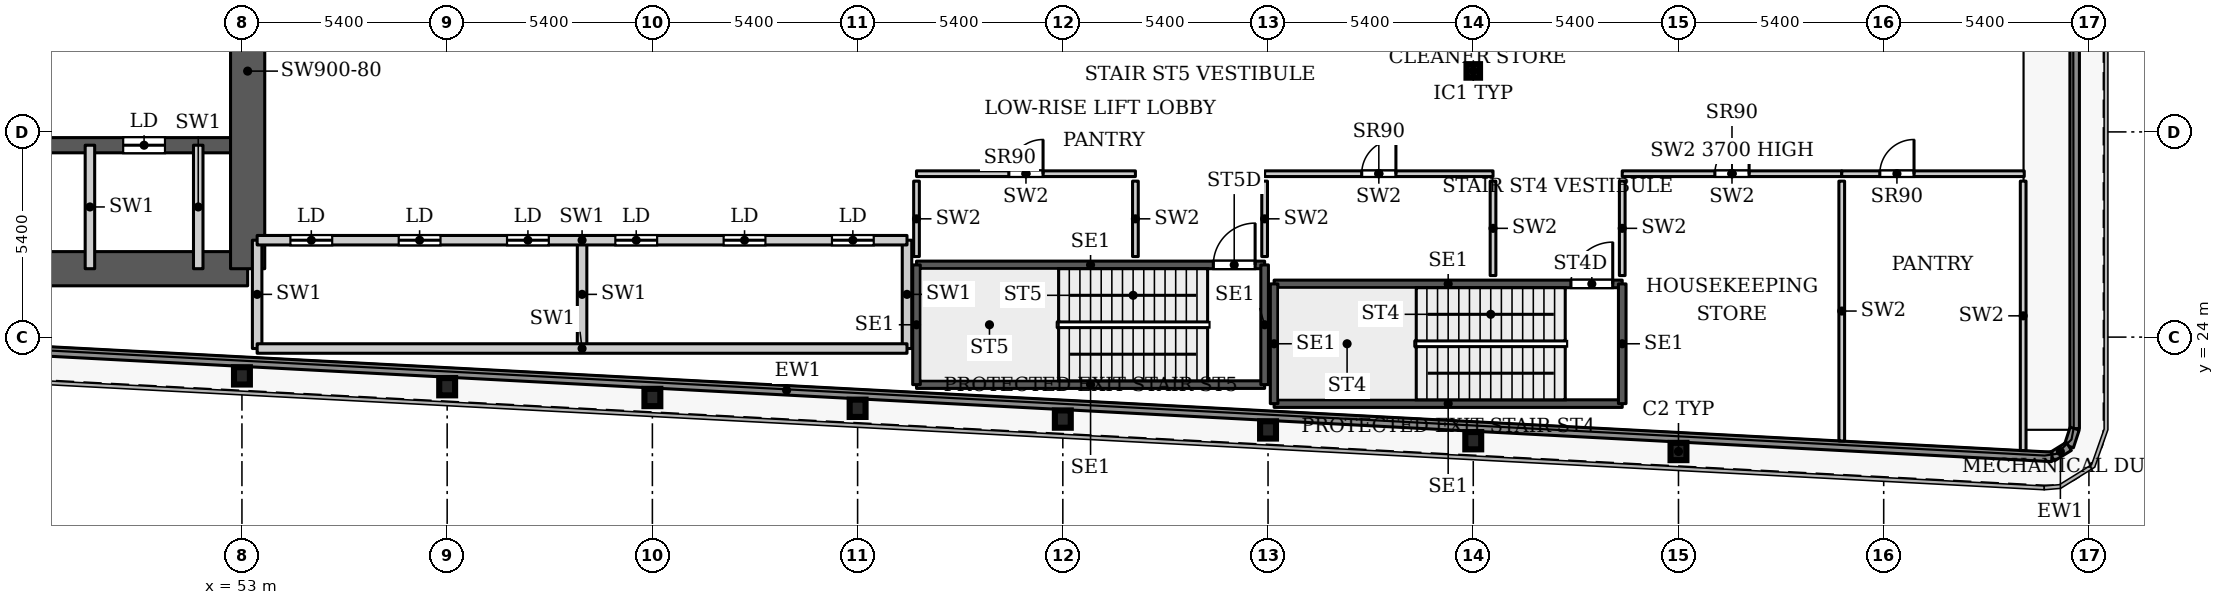
"""IFC4 building model, lengths in metres.
Left out: names, types, materials, properties, quantities, classifications, styles, units other than length and angle.
Written with IfcOpenShell. Run it as: python <this file> out.ifc"""

import sys

from ifc_helpers import new_model, si_unit, direction, frame, frame_2d, origin, origin_2d, place, context, subcontext, project, spatial, rectangle, hollow_rectangle, i_section, extrude, source, transform, mapped, element, fill, save


model = new_model("IFC4")
c1 = context("Model", 3, precision=1e-05, world=origin(), true_north=direction((0.0, 1.0)))
c2 = subcontext(c1, "Body", "Model", "MODEL_VIEW")
j1 = project(units=[si_unit("LENGTHUNIT", "METRE"), si_unit("PLANEANGLEUNIT", "RADIAN")], contexts=[c1])
p1 = place(None, origin())
s1 = spatial("IfcSite", under=j1, at=p1, CompositionType="ELEMENT")
p2 = place(p1, origin())
s2 = spatial("IfcBuilding", under=s1, at=p2, CompositionType="ELEMENT")
p3 = place(p2, frame((0.0, 0.0, 89.0)))
s3 = spatial("IfcBuildingStorey", under=s2, at=p3, CompositionType="ELEMENT", Elevation=89.0)
for number, where, z_axis, x_axis in (
    (1, (90.8, 20.99, 0.0), (0.0, 0.0, 1.0), (1.0, 0.0, 0.0)),
    (2, (85.4, 21.274, 0.0), (0.0, 0.0, 1.0), (1.0, 0.0, 0.0)),
    (3, (80.0, 21.558, 0.0), (0.0, 0.0, 1.0), (1.0, 0.0, 0.0)),
    (4, (74.6, 21.843, 0.0), (0.0, 0.0, 1.0), (1.0, 0.0, 0.0)),
    (5, (69.2, 22.127, 0.0), (0.0, 0.0, 1.0), (1.0, 0.0, 0.0)),
    (6, (63.8, 22.411, 0.0), (0.0, 0.0, 1.0), (1.0, 0.0, 0.0)),
    (7, (58.4, 22.695, 0.0), (0.0, 0.0, 1.0), (1.0, 0.0, 0.0)),
    (8, (53.0, 22.98, 0.0), (0.0, 0.0, 1.0), (1.0, 0.0, 0.0)),
):
    element("IfcColumn", number, at=place(p3, frame(where, z_axis=z_axis, x_axis=x_axis)), inside=s3, PredefinedType="COLUMN", context=c2, shape_type="SweptSolid", body=[
        extrude(i_section(OverallWidth=0.418, OverallDepth=0.455, WebThickness=0.042, FlangeThickness=0.068, FilletRadius=0.014, at=origin_2d()), origin(), (0.0, 0.0, 1.0), 5.1),
    ])
p4 = place(p3, frame((85.4, 31.005, 0.0), z_axis=(0.0, 0.0, 1.0), x_axis=(1.0, 0.0, 0.0)))
e9 = element("IfcColumn", 9, at=p4, inside=s3, PredefinedType="COLUMN", context=c2, shape_type="SweptSolid", body=[
    extrude(hollow_rectangle(XDim=0.356, YDim=0.356, WallThickness=0.016, InnerFilletRadius=0.016, OuterFilletRadius=0.032, at=origin_2d()), origin(), (0.0, 0.0, 1.0), 5.1),
])
p5 = place(p3, frame((34.75, 25.8, 0.0), z_axis=(0.0, 0.0, 1.0), x_axis=(1.0, 0.0, 0.0)))
e10 = element("IfcWall", 10, at=p5, inside=s3, PredefinedType="SHEAR", context=c2, shape_type="SweptSolid", body=[
    extrude(rectangle(XDim=18.4, YDim=0.9, at=frame_2d((9.2, 0.0))), origin(), (0.0, 0.0, 1.0), 5.1),
])
p6 = place(p3, frame((34.75, 29.05, 0.0), z_axis=(0.0, 0.0, 1.0), x_axis=(1.0, 0.0, 0.0)))
e11 = element("IfcWall", 11, at=p6, inside=s3, PredefinedType="SHEAR", context=c2, shape_type="SweptSolid", body=[
    extrude(rectangle(XDim=18.4, YDim=0.4, at=frame_2d((9.2, 0.0))), origin(), (0.0, 0.0, 1.0), 5.1),
])
p7 = place(p6, frame((15.125, 0.0, 0.0)))
e12 = element("IfcOpeningElement", 12, at=p7, cuts=e11, PredefinedType="OPENING", context=c2, shape_type="SweptSolid", body=[
    extrude(rectangle(XDim=1.1, YDim=2.2, at=frame_2d((0.55, 1.1))), frame((0.0, 0.21, 0.0), z_axis=(0.0, -1.0, 0.0), x_axis=(1.0, 0.0, 0.0)), (0.0, 0.0, 1.0), 0.42),
])
p8 = place(p3, frame((53.15, 25.8, 0.0), z_axis=(0.0, 0.0, 1.0), x_axis=(0.0, 1.0, 0.0)))
e13 = element("IfcWall", 13, at=p8, inside=s3, PredefinedType="SHEAR", context=c2, shape_type="SweptSolid", body=[
    extrude(rectangle(XDim=10.4, YDim=0.9, at=frame_2d((5.2, 0.0))), origin(), (0.0, 0.0, 1.0), 5.1),
])
p9 = place(p3, frame((101.225, 44.66, 0.0), z_axis=(0.0, 0.0, 1.0), x_axis=(0.0, -1.0, 0.0)))
e14 = element("IfcWall", 14, at=p9, inside=s3, PredefinedType="SOLIDWALL", context=c2, shape_type="SweptSolid", body=[
    extrude(rectangle(XDim=23.068, YDim=0.25, at=frame_2d((11.534, 0.0))), origin(), (0.0, 0.0, 1.0), 4.95),
])
p10 = place(p3, frame((101.225, 21.592, 0.0), z_axis=(0.0, 0.0, 1.0), x_axis=(-0.310245653009, -0.950656423104, 0.0)))
e15 = element("IfcWall", 15, at=p10, inside=s3, PredefinedType="SOLIDWALL", context=c2, shape_type="SweptSolid", body=[
    extrude(rectangle(XDim=0.49, YDim=0.25, at=frame_2d((0.245, 0.0))), origin(), (0.0, 0.0, 1.0), 4.95),
])
p11 = place(p3, frame((101.073, 21.126, 0.0), z_axis=(0.0, 0.0, 1.0), x_axis=(-0.849633012236, -0.527374387432, 0.0)))
e16 = element("IfcWall", 16, at=p11, inside=s3, PredefinedType="SOLIDWALL", context=c2, shape_type="SweptSolid", body=[
    extrude(rectangle(XDim=0.527, YDim=0.25, at=frame_2d((0.264, 0.0))), origin(), (0.0, 0.0, 1.0), 4.95),
])
p12 = place(p3, frame((100.625, 20.848, 0.0), z_axis=(0.0, 0.0, 1.0), x_axis=(-0.998617353906, 0.052567865445, 0.0)))
e17 = element("IfcWall", 17, at=p12, inside=s3, PredefinedType="SOLIDWALL", context=c2, shape_type="SweptSolid", body=[
    extrude(rectangle(XDim=66.678, YDim=0.25, at=frame_2d((33.339, 0.0))), origin(), (0.0, 0.0, 1.0), 4.95),
])
p13 = place(p3, frame((80.16, 22.25, 0.0), z_axis=(0.0, 0.0, 1.0), x_axis=(1.0, 0.0, 0.0)))
e18 = element("IfcWall", 18, at=p13, inside=s3, PredefinedType="SHEAR", context=c2, shape_type="SweptSolid", body=[
    extrude(rectangle(XDim=9.16, YDim=0.2, at=frame_2d((4.58, 0.0))), origin(), (0.0, 0.0, 1.0), 5.1),
])
p14 = place(p3, frame((80.16, 25.4, 0.0), z_axis=(0.0, 0.0, 1.0), x_axis=(1.0, 0.0, 0.0)))
e19 = element("IfcWall", 19, at=p14, inside=s3, PredefinedType="SHEAR", context=c2, shape_type="SweptSolid", body=[
    extrude(rectangle(XDim=9.16, YDim=0.2, at=frame_2d((4.58, 0.0))), origin(), (0.0, 0.0, 1.0), 5.1),
])
p15 = place(p14, frame((7.81, 0.0, 0.0)))
e20 = element("IfcOpeningElement", 20, at=p15, cuts=e19, PredefinedType="OPENING", context=c2, shape_type="SweptSolid", body=[
    extrude(rectangle(XDim=1.1, YDim=2.2, at=frame_2d((0.55, 1.1))), frame((0.0, 0.11, 0.0), z_axis=(0.0, -1.0, 0.0), x_axis=(1.0, 0.0, 0.0)), (0.0, 0.0, 1.0), 0.22),
])
for number, where, z_axis, x_axis in (
    (21, (80.16, 22.25, 0.0), (0.0, 0.0, 1.0), (0.0, 1.0, 0.0)),
    (22, (89.32, 22.25, 0.0), (0.0, 0.0, 1.0), (0.0, 1.0, 0.0)),
):
    element("IfcWall", number, at=place(p3, frame(where, z_axis=z_axis, x_axis=x_axis)), inside=s3, PredefinedType="SHEAR", context=c2, shape_type="SweptSolid", body=[
        extrude(rectangle(XDim=3.15, YDim=0.2, at=frame_2d((1.575, 0.0))), origin(), (0.0, 0.0, 1.0), 5.1),
    ])
p16 = place(p3, frame((70.75, 22.75, 0.0), z_axis=(0.0, 0.0, 1.0), x_axis=(1.0, 0.0, 0.0)))
e23 = element("IfcWall", 23, at=p16, inside=s3, PredefinedType="SHEAR", context=c2, shape_type="SweptSolid", body=[
    extrude(rectangle(XDim=9.16, YDim=0.2, at=frame_2d((4.58, 0.0))), origin(), (0.0, 0.0, 1.0), 5.1),
])
p17 = place(p3, frame((70.75, 25.9, 0.0), z_axis=(0.0, 0.0, 1.0), x_axis=(1.0, 0.0, 0.0)))
e24 = element("IfcWall", 24, at=p17, inside=s3, PredefinedType="SHEAR", context=c2, shape_type="SweptSolid", body=[
    extrude(rectangle(XDim=9.16, YDim=0.2, at=frame_2d((4.58, 0.0))), origin(), (0.0, 0.0, 1.0), 5.1),
])
p18 = place(p17, frame((7.81, 0.0, 0.0)))
e25 = element("IfcOpeningElement", 25, at=p18, cuts=e24, PredefinedType="OPENING", context=c2, shape_type="SweptSolid", body=[
    extrude(rectangle(XDim=1.1, YDim=2.2, at=frame_2d((0.55, 1.1))), frame((0.0, 0.11, 0.0), z_axis=(0.0, -1.0, 0.0), x_axis=(1.0, 0.0, 0.0)), (0.0, 0.0, 1.0), 0.22),
])
for number, where, z_axis, x_axis in (
    (26, (70.75, 22.75, 0.0), (0.0, 0.0, 1.0), (0.0, 1.0, 0.0)),
    (27, (79.91, 22.75, 0.0), (0.0, 0.0, 1.0), (0.0, 1.0, 0.0)),
):
    element("IfcWall", number, at=place(p3, frame(where, z_axis=z_axis, x_axis=x_axis)), inside=s3, PredefinedType="SHEAR", context=c2, shape_type="SweptSolid", body=[
        extrude(rectangle(XDim=3.15, YDim=0.2, at=frame_2d((1.575, 0.0))), origin(), (0.0, 0.0, 1.0), 5.1),
    ])
for number, where, z_axis, x_axis in (
    (28, (49.0, 25.8, 0.0), (0.0, 0.0, 1.0), (0.0, 1.0, 0.0)),
    (29, (51.85, 25.8, 0.0), (0.0, 0.0, 1.0), (0.0, 1.0, 0.0)),
):
    element("IfcWall", number, at=place(p3, frame(where, z_axis=z_axis, x_axis=x_axis)), inside=s3, PredefinedType="PARTITIONING", context=c2, shape_type="SweptSolid", body=[
        extrude(rectangle(XDim=3.25, YDim=0.25, at=frame_2d((1.625, 0.0))), origin(), (0.0, 0.0, 1.0), 5.1),
    ])
for number, where, z_axis, x_axis in (
    (30, (53.4, 23.7, 0.0), (0.0, 0.0, 1.0), (0.0, 1.0, 0.0)),
    (31, (61.95, 23.7, 0.0), (0.0, 0.0, 1.0), (0.0, 1.0, 0.0)),
    (32, (70.5, 23.7, 0.0), (0.0, 0.0, 1.0), (0.0, 1.0, 0.0)),
):
    element("IfcWall", number, at=place(p3, frame(where, z_axis=z_axis, x_axis=x_axis)), inside=s3, PredefinedType="PARTITIONING", context=c2, shape_type="SweptSolid", body=[
        extrude(rectangle(XDim=2.85, YDim=0.25, at=frame_2d((1.425, 0.0))), origin(), (0.0, 0.0, 1.0), 5.1),
    ])
p19 = place(p3, frame((53.4, 23.7, 0.0), z_axis=(0.0, 0.0, 1.0), x_axis=(1.0, 0.0, 0.0)))
e33 = element("IfcWall", 33, at=p19, inside=s3, PredefinedType="PARTITIONING", context=c2, shape_type="SweptSolid", body=[
    extrude(rectangle(XDim=17.1, YDim=0.25, at=frame_2d((8.55, 0.0))), origin(), (0.0, 0.0, 1.0), 5.1),
])
p20 = place(p3, frame((53.4, 26.55, 0.0), z_axis=(0.0, 0.0, 1.0), x_axis=(1.0, 0.0, 0.0)))
e34 = element("IfcWall", 34, at=p20, inside=s3, PredefinedType="PARTITIONING", context=c2, shape_type="SweptSolid", body=[
    extrude(rectangle(XDim=17.1, YDim=0.25, at=frame_2d((8.55, 0.0))), origin(), (0.0, 0.0, 1.0), 5.1),
])
p21 = place(p20, frame((0.875, 0.0, 0.0)))
e35 = element("IfcOpeningElement", 35, at=p21, cuts=e34, PredefinedType="OPENING", context=c2, shape_type="SweptSolid", body=[
    extrude(rectangle(XDim=1.1, YDim=2.2, at=frame_2d((0.55, 1.1))), frame((0.0, 0.135, 0.0), z_axis=(0.0, -1.0, 0.0), x_axis=(1.0, 0.0, 0.0)), (0.0, 0.0, 1.0), 0.27),
])
p22 = place(p20, frame((3.725, 0.0, 0.0)))
e36 = element("IfcOpeningElement", 36, at=p22, cuts=e34, PredefinedType="OPENING", context=c2, shape_type="SweptSolid", body=[
    extrude(rectangle(XDim=1.1, YDim=2.2, at=frame_2d((0.55, 1.1))), frame((0.0, 0.135, 0.0), z_axis=(0.0, -1.0, 0.0), x_axis=(1.0, 0.0, 0.0)), (0.0, 0.0, 1.0), 0.27),
])
p23 = place(p20, frame((6.575, 0.0, 0.0)))
e37 = element("IfcOpeningElement", 37, at=p23, cuts=e34, PredefinedType="OPENING", context=c2, shape_type="SweptSolid", body=[
    extrude(rectangle(XDim=1.1, YDim=2.2, at=frame_2d((0.55, 1.1))), frame((0.0, 0.135, 0.0), z_axis=(0.0, -1.0, 0.0), x_axis=(1.0, 0.0, 0.0)), (0.0, 0.0, 1.0), 0.27),
])
p24 = place(p20, frame((9.425, 0.0, 0.0)))
e38 = element("IfcOpeningElement", 38, at=p24, cuts=e34, PredefinedType="OPENING", context=c2, shape_type="SweptSolid", body=[
    extrude(rectangle(XDim=1.1, YDim=2.2, at=frame_2d((0.55, 1.1))), frame((0.0, 0.135, 0.0), z_axis=(0.0, -1.0, 0.0), x_axis=(1.0, 0.0, 0.0)), (0.0, 0.0, 1.0), 0.27),
])
p25 = place(p20, frame((12.275, 0.0, 0.0)))
e39 = element("IfcOpeningElement", 39, at=p25, cuts=e34, PredefinedType="OPENING", context=c2, shape_type="SweptSolid", body=[
    extrude(rectangle(XDim=1.1, YDim=2.2, at=frame_2d((0.55, 1.1))), frame((0.0, 0.135, 0.0), z_axis=(0.0, -1.0, 0.0), x_axis=(1.0, 0.0, 0.0)), (0.0, 0.0, 1.0), 0.27),
])
p26 = place(p20, frame((15.125, 0.0, 0.0)))
e40 = element("IfcOpeningElement", 40, at=p26, cuts=e34, PredefinedType="OPENING", context=c2, shape_type="SweptSolid", body=[
    extrude(rectangle(XDim=1.1, YDim=2.2, at=frame_2d((0.55, 1.1))), frame((0.0, 0.135, 0.0), z_axis=(0.0, -1.0, 0.0), x_axis=(1.0, 0.0, 0.0)), (0.0, 0.0, 1.0), 0.27),
])
p27 = place(p3, frame((70.75, 28.3, 0.0), z_axis=(0.0, 0.0, 1.0), x_axis=(1.0, 0.0, 0.0)))
e41 = element("IfcWall", 41, at=p27, inside=s3, PredefinedType="PARTITIONING", context=c2, shape_type="SweptSolid", body=[
    extrude(rectangle(XDim=5.76, YDim=0.15, at=frame_2d((2.88, 0.0))), origin(), (0.0, 0.0, 1.0), 5.1),
])
p28 = place(p27, frame((2.43, 0.0, 0.0)))
e42 = element("IfcOpeningElement", 42, at=p28, cuts=e41, PredefinedType="OPENING", context=c2, shape_type="SweptSolid", body=[
    extrude(rectangle(XDim=0.9, YDim=2.2, at=frame_2d((0.45, 1.1))), frame((0.0, 0.085, 0.0), z_axis=(0.0, -1.0, 0.0), x_axis=(1.0, 0.0, 0.0)), (0.0, 0.0, 1.0), 0.17),
])
for number, where, z_axis, x_axis in (
    (43, (70.75, 26.12, 0.0), (0.0, 0.0, 1.0), (0.0, 1.0, 0.0)),
    (44, (76.51, 26.12, 0.0), (0.0, 0.0, 1.0), (0.0, 1.0, 0.0)),
):
    element("IfcWall", number, at=place(p3, frame(where, z_axis=z_axis, x_axis=x_axis)), inside=s3, PredefinedType="PARTITIONING", context=c2, shape_type="SweptSolid", body=[
        extrude(rectangle(XDim=1.985, YDim=0.15, at=frame_2d((0.992, 0.0))), origin(), (0.0, 0.0, 1.0), 5.1),
    ])
p29 = place(p3, frame((79.91, 28.3, 0.0), z_axis=(0.0, 0.0, 1.0), x_axis=(1.0, 0.0, 0.0)))
e45 = element("IfcWall", 45, at=p29, inside=s3, PredefinedType="PARTITIONING", context=c2, shape_type="SweptSolid", body=[
    extrude(rectangle(XDim=6.01, YDim=0.15, at=frame_2d((3.005, 0.0))), origin(), (0.0, 0.0, 1.0), 5.1),
])
p30 = place(p29, frame((2.555, 0.0, 0.0)))
e46 = element("IfcOpeningElement", 46, at=p30, cuts=e45, PredefinedType="OPENING", context=c2, shape_type="SweptSolid", body=[
    extrude(rectangle(XDim=0.9, YDim=2.2, at=frame_2d((0.45, 1.1))), frame((0.0, 0.085, 0.0), z_axis=(0.0, -1.0, 0.0), x_axis=(1.0, 0.0, 0.0)), (0.0, 0.0, 1.0), 0.17),
])
p31 = place(p3, frame((79.91, 26.12, 0.0), z_axis=(0.0, 0.0, 1.0), x_axis=(0.0, 1.0, 0.0)))
e47 = element("IfcWall", 47, at=p31, inside=s3, PredefinedType="PARTITIONING", context=c2, shape_type="SweptSolid", body=[
    extrude(rectangle(XDim=1.985, YDim=0.15, at=frame_2d((0.992, 0.0))), origin(), (0.0, 0.0, 1.0), 5.1),
])
p32 = place(p3, frame((85.92, 25.62, 0.0), z_axis=(0.0, 0.0, 1.0), x_axis=(0.0, 1.0, 0.0)))
e48 = element("IfcWall", 48, at=p32, inside=s3, PredefinedType="PARTITIONING", context=c2, shape_type="SweptSolid", body=[
    extrude(rectangle(XDim=2.485, YDim=0.15, at=frame_2d((1.242, 0.0))), origin(), (0.0, 0.0, 1.0), 5.1),
])
p33 = place(p3, frame((89.32, 28.3, 0.0), z_axis=(0.0, 0.0, 1.0), x_axis=(1.0, 0.0, 0.0)))
e49 = element("IfcWall", 49, at=p33, inside=s3, PredefinedType="PARTITIONING", context=c2, shape_type="SweptSolid", body=[
    extrude(rectangle(XDim=5.776, YDim=0.15, at=frame_2d((2.888, 0.0))), origin(), (0.0, 0.0, 1.0), 3.7),
])
p34 = place(p33, frame((2.438, 0.0, 0.0)))
e50 = element("IfcOpeningElement", 50, at=p34, cuts=e49, PredefinedType="OPENING", context=c2, shape_type="SweptSolid", body=[
    extrude(rectangle(XDim=0.9, YDim=2.2, at=frame_2d((0.45, 1.1))), frame((0.0, 0.085, 0.0), z_axis=(0.0, -1.0, 0.0), x_axis=(1.0, 0.0, 0.0)), (0.0, 0.0, 1.0), 0.17),
])
p35 = place(p3, frame((89.32, 25.62, 0.0), z_axis=(0.0, 0.0, 1.0), x_axis=(0.0, 1.0, 0.0)))
e51 = element("IfcWall", 51, at=p35, inside=s3, PredefinedType="PARTITIONING", context=c2, shape_type="SweptSolid", body=[
    extrude(rectangle(XDim=2.485, YDim=0.15, at=frame_2d((1.242, 0.0))), origin(), (0.0, 0.0, 1.0), 5.1),
])
p36 = place(p3, frame((95.096, 21.267, 0.0), z_axis=(0.0, 0.0, 1.0), x_axis=(0.0, 1.0, 0.0)))
e52 = element("IfcWall", 52, at=p36, inside=s3, PredefinedType="PARTITIONING", context=c2, shape_type="SweptSolid", body=[
    extrude(rectangle(XDim=6.838, YDim=0.15, at=frame_2d((3.419, 0.0))), origin(), (0.0, 0.0, 1.0), 5.1),
])
p37 = place(p3, frame((95.096, 28.3, 0.0), z_axis=(0.0, 0.0, 1.0), x_axis=(1.0, 0.0, 0.0)))
e53 = element("IfcWall", 53, at=p37, inside=s3, PredefinedType="PARTITIONING", context=c2, shape_type="SweptSolid", body=[
    extrude(rectangle(XDim=4.802, YDim=0.15, at=frame_2d((2.401, 0.0))), origin(), (0.0, 0.0, 1.0), 5.1),
])
p38 = place(p37, frame((1.002, 0.0, 0.0)))
e54 = element("IfcOpeningElement", 54, at=p38, cuts=e53, PredefinedType="OPENING", context=c2, shape_type="SweptSolid", body=[
    extrude(rectangle(XDim=0.9, YDim=2.2, at=frame_2d((0.45, 1.1))), frame((0.0, 0.085, 0.0), z_axis=(0.0, -1.0, 0.0), x_axis=(1.0, 0.0, 0.0)), (0.0, 0.0, 1.0), 0.17),
])
p39 = place(p3, frame((99.87, 21.015, 0.0), z_axis=(0.0, 0.0, 1.0), x_axis=(0.0, 1.0, 0.0)))
e55 = element("IfcWall", 55, at=p39, inside=s3, PredefinedType="PARTITIONING", context=c2, shape_type="SweptSolid", body=[
    extrude(rectangle(XDim=7.09, YDim=0.15, at=frame_2d((3.545, 0.0))), origin(), (0.0, 0.0, 1.0), 5.1),
])
m1 = source(origin(), c2, "Body", "SweptSolid", [
    extrude(rectangle(XDim=1.1, YDim=2.2, at=frame_2d((0.55, 1.1))), frame((0.0, 0.025, 0.0), z_axis=(0.0, -1.0, 0.0), x_axis=(1.0, 0.0, 0.0)), (0.0, 0.0, 1.0), 0.05),
])
p40 = place(p21, origin())
e56 = element("IfcDoor", 56, at=p40, inside=s3, OperationType="SLIDING_TO_LEFT", PredefinedType="DOOR", context=c2, shape_type="MappedRepresentation", body=[
    mapped(m1, transform((0.0, 0.0, 0.0), x_axis=(1.0, 0.0, 0.0), y_axis=(0.0, 1.0, 0.0), z_axis=(0.0, 0.0, 1.0), scale=1.0)),
])
fill(e35, e56)
p41 = place(p22, origin())
e57 = element("IfcDoor", 57, at=p41, inside=s3, OperationType="SLIDING_TO_LEFT", PredefinedType="DOOR", context=c2, shape_type="MappedRepresentation", body=[
    mapped(m1, transform((0.0, 0.0, 0.0), x_axis=(1.0, 0.0, 0.0), y_axis=(0.0, 1.0, 0.0), z_axis=(0.0, 0.0, 1.0), scale=1.0)),
])
fill(e36, e57)
p42 = place(p23, origin())
e58 = element("IfcDoor", 58, at=p42, inside=s3, OperationType="SLIDING_TO_LEFT", PredefinedType="DOOR", context=c2, shape_type="MappedRepresentation", body=[
    mapped(m1, transform((0.0, 0.0, 0.0), x_axis=(1.0, 0.0, 0.0), y_axis=(0.0, 1.0, 0.0), z_axis=(0.0, 0.0, 1.0), scale=1.0)),
])
fill(e37, e58)
p43 = place(p24, origin())
e59 = element("IfcDoor", 59, at=p43, inside=s3, OperationType="SLIDING_TO_LEFT", PredefinedType="DOOR", context=c2, shape_type="MappedRepresentation", body=[
    mapped(m1, transform((0.0, 0.0, 0.0), x_axis=(1.0, 0.0, 0.0), y_axis=(0.0, 1.0, 0.0), z_axis=(0.0, 0.0, 1.0), scale=1.0)),
])
fill(e38, e59)
p44 = place(p25, origin())
e60 = element("IfcDoor", 60, at=p44, inside=s3, OperationType="SLIDING_TO_LEFT", PredefinedType="DOOR", context=c2, shape_type="MappedRepresentation", body=[
    mapped(m1, transform((0.0, 0.0, 0.0), x_axis=(1.0, 0.0, 0.0), y_axis=(0.0, 1.0, 0.0), z_axis=(0.0, 0.0, 1.0), scale=1.0)),
])
fill(e39, e60)
p45 = place(p26, origin())
e61 = element("IfcDoor", 61, at=p45, inside=s3, OperationType="SLIDING_TO_LEFT", PredefinedType="DOOR", context=c2, shape_type="MappedRepresentation", body=[
    mapped(m1, transform((0.0, 0.0, 0.0), x_axis=(1.0, 0.0, 0.0), y_axis=(0.0, 1.0, 0.0), z_axis=(0.0, 0.0, 1.0), scale=1.0)),
])
fill(e40, e61)
p46 = place(p7, origin())
e62 = element("IfcDoor", 62, at=p46, inside=s3, OperationType="SLIDING_TO_LEFT", PredefinedType="DOOR", context=c2, shape_type="MappedRepresentation", body=[
    mapped(m1, transform((0.0, 0.0, 0.0), x_axis=(1.0, 0.0, 0.0), y_axis=(0.0, 1.0, 0.0), z_axis=(0.0, 0.0, 1.0), scale=1.0)),
])
fill(e12, e62)
m2 = source(origin(), c2, "Body", "SweptSolid", [
    extrude(rectangle(XDim=0.9, YDim=2.2, at=frame_2d((0.45, 1.1))), frame((0.0, 0.025, 0.0), z_axis=(0.0, -1.0, 0.0), x_axis=(1.0, 0.0, 0.0)), (0.0, 0.0, 1.0), 0.05),
])
p47 = place(p28, origin())
e63 = element("IfcDoor", 63, at=p47, inside=s3, OperationType="SINGLE_SWING_LEFT", PredefinedType="DOOR", context=c2, shape_type="MappedRepresentation", body=[
    mapped(m2, transform((0.0, 0.0, 0.0), x_axis=(1.0, 0.0, 0.0), y_axis=(0.0, 1.0, 0.0), z_axis=(0.0, 0.0, 1.0), scale=1.0)),
])
fill(e42, e63)
p48 = place(p30, origin())
e64 = element("IfcDoor", 64, at=p48, inside=s3, OperationType="SINGLE_SWING_LEFT", PredefinedType="DOOR", context=c2, shape_type="MappedRepresentation", body=[
    mapped(m2, transform((0.0, 0.0, 0.0), x_axis=(1.0, 0.0, 0.0), y_axis=(0.0, 1.0, 0.0), z_axis=(0.0, 0.0, 1.0), scale=1.0)),
])
fill(e46, e64)
p49 = place(p34, origin())
e65 = element("IfcDoor", 65, at=p49, inside=s3, OperationType="SINGLE_SWING_LEFT", PredefinedType="DOOR", context=c2, shape_type="MappedRepresentation", body=[
    mapped(m2, transform((0.0, 0.0, 0.0), x_axis=(1.0, 0.0, 0.0), y_axis=(0.0, 1.0, 0.0), z_axis=(0.0, 0.0, 1.0), scale=1.0)),
])
fill(e50, e65)
p50 = place(p38, origin())
e66 = element("IfcDoor", 66, at=p50, inside=s3, OperationType="SINGLE_SWING_LEFT", PredefinedType="DOOR", context=c2, shape_type="MappedRepresentation", body=[
    mapped(m2, transform((0.0, 0.0, 0.0), x_axis=(1.0, 0.0, 0.0), y_axis=(0.0, 1.0, 0.0), z_axis=(0.0, 0.0, 1.0), scale=1.0)),
])
fill(e54, e66)
m3 = source(origin(), c2, "Body", "SweptSolid", [
    extrude(rectangle(XDim=1.1, YDim=2.2, at=frame_2d((0.55, 1.1))), frame((0.0, 0.025, 0.0), z_axis=(0.0, -1.0, 0.0), x_axis=(1.0, 0.0, 0.0)), (0.0, 0.0, 1.0), 0.05),
])
p51 = place(p15, origin())
e67 = element("IfcDoor", 67, at=p51, inside=s3, OperationType="SINGLE_SWING_LEFT", PredefinedType="DOOR", context=c2, shape_type="MappedRepresentation", body=[
    mapped(m3, transform((0.0, 0.0, 0.0), x_axis=(1.0, 0.0, 0.0), y_axis=(0.0, 1.0, 0.0), z_axis=(0.0, 0.0, 1.0), scale=1.0)),
])
fill(e20, e67)
p52 = place(p18, origin())
e68 = element("IfcDoor", 68, at=p52, inside=s3, OperationType="SINGLE_SWING_LEFT", PredefinedType="DOOR", context=c2, shape_type="MappedRepresentation", body=[
    mapped(m3, transform((0.0, 0.0, 0.0), x_axis=(1.0, 0.0, 0.0), y_axis=(0.0, 1.0, 0.0), z_axis=(0.0, 0.0, 1.0), scale=1.0)),
])
fill(e25, e68)
save(model, sys.argv[1])
